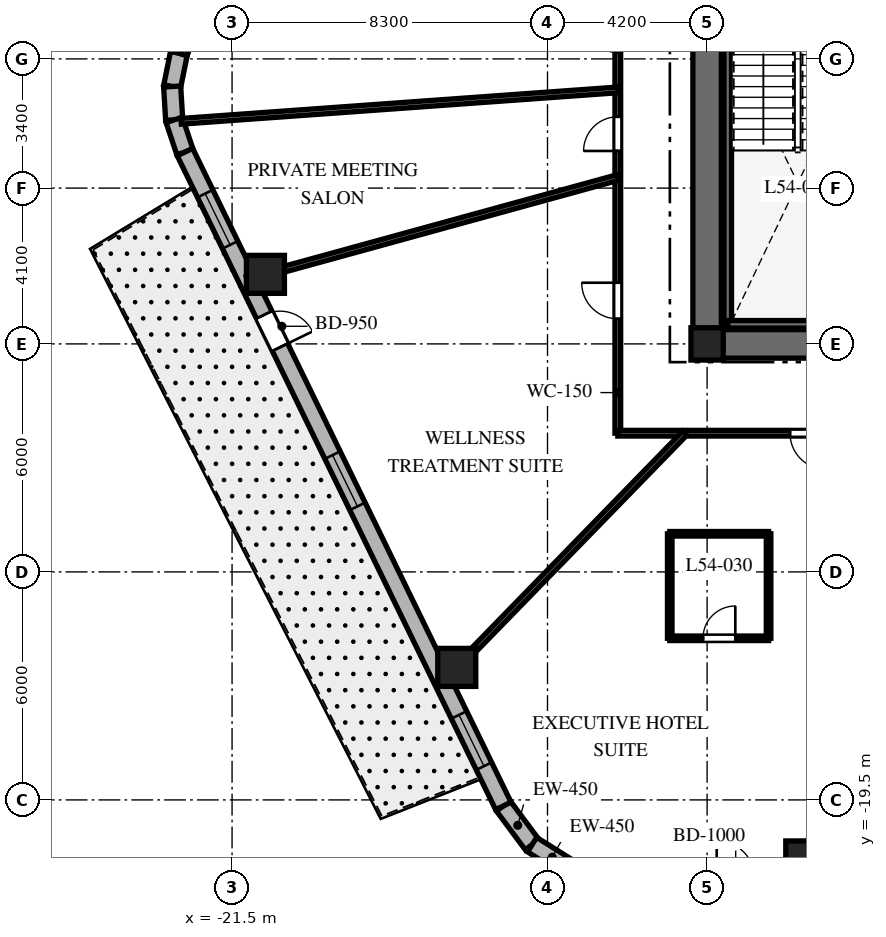
"""IFC4 building model, lengths in metres.
Left out: names, types, materials, properties, quantities, classifications, styles, units other than length and angle.
Written with IfcOpenShell. Run it as: python <this file> out.ifc"""

import sys

from ifc_helpers import new_model, si_unit, direction, frame, frame_2d, origin, origin_2d, place, context, subcontext, project, spatial, rectangle, extrude, element, fill, save


model = new_model("IFC4")
c1 = context("Model", 3, precision=1e-05, world=origin(), true_north=direction((0.0, 1.0)))
c2 = subcontext(c1, "Body", "Model", "MODEL_VIEW")
j1 = project(units=[si_unit("LENGTHUNIT", "METRE"), si_unit("PLANEANGLEUNIT", "RADIAN")], contexts=[c1])
p1 = place(None, origin())
s1 = spatial("IfcSite", under=j1, at=p1, CompositionType="ELEMENT")
p2 = place(p1, origin())
s2 = spatial("IfcBuilding", under=s1, at=p2, CompositionType="ELEMENT")
p3 = place(p2, frame((0.0, 0.0, 217.9)))
s3 = spatial("IfcBuildingStorey", under=s2, at=p3, CompositionType="ELEMENT", Elevation=217.9)
p4 = place(p3, frame((-9.375, -7.5, 0.0), z_axis=(0.0, 0.0, 1.0), x_axis=(1.0, 0.0, 0.0)))
e1 = element("IfcWall", 1, at=p4, inside=s3, PredefinedType="SHEAR", context=c2, shape_type="SweptSolid", body=[
    extrude(rectangle(XDim=18.75, YDim=0.75, at=frame_2d((9.375, 0.0))), origin(), (0.0, 0.0, 1.0), 3.8),
])
p5 = place(p4, frame((9.425, 0.0, 0.0)))
e2 = element("IfcOpeningElement", 2, at=p5, cuts=e1, PredefinedType="OPENING", context=c2, shape_type="SweptSolid", body=[
    extrude(rectangle(XDim=1.0, YDim=2.15, at=frame_2d((0.5, 1.075))), frame((0.0, 0.385, 0.0), z_axis=(0.0, -1.0, 0.0), x_axis=(1.0, 0.0, 0.0)), (0.0, 0.0, 1.0), 0.77),
])
p6 = place(p3, frame((-9.0, -7.125, 0.0), z_axis=(0.0, 0.0, 1.0), x_axis=(0.0, 1.0, 0.0)))
e3 = element("IfcWall", 3, at=p6, inside=s3, PredefinedType="SHEAR", context=c2, shape_type="SweptSolid", body=[
    extrude(rectangle(XDim=14.25, YDim=0.75, at=frame_2d((7.125, 0.0))), origin(), (0.0, 0.0, 1.0), 3.8),
])
p7 = place(p6, frame((10.25, 0.0, 0.0)))
e4 = element("IfcOpeningElement", 4, at=p7, cuts=e3, PredefinedType="OPENING", context=c2, shape_type="SweptSolid", body=[
    extrude(rectangle(XDim=1.05, YDim=2.15, at=frame_2d((0.525, 1.075))), frame((0.0, 0.385, 0.0), z_axis=(0.0, -1.0, 0.0), x_axis=(1.0, 0.0, 0.0)), (0.0, 0.0, 1.0), 0.77),
])
p8 = place(p3, frame((-8.458, -6.985, 0.0), z_axis=(0.0, 0.0, 1.0), x_axis=(0.0, 1.0, 0.0)))
e5 = element("IfcWall", 5, at=p8, inside=s3, PredefinedType="SHEAR", context=c2, shape_type="SweptSolid", body=[
    extrude(rectangle(XDim=9.143, YDim=0.2, at=frame_2d((4.572, 0.0))), origin(), (0.0, 0.0, 1.0), 3.8),
])
p9 = place(p3, frame((-8.458, -6.985, 0.0), z_axis=(0.0, 0.0, 1.0), x_axis=(1.0, 0.0, 0.0)))
e6 = element("IfcWall", 6, at=p9, inside=s3, PredefinedType="SHEAR", context=c2, shape_type="SweptSolid", body=[
    extrude(rectangle(XDim=3.686, YDim=0.2, at=frame_2d((1.843, 0.0))), origin(), (0.0, 0.0, 1.0), 3.8),
])
p10 = place(p3, frame((-9.0, -7.5, 0.0), z_axis=(0.0, 0.0, 1.0), x_axis=(1.0, 0.0, 0.0)))
e7 = element("IfcColumn", 7, at=p10, inside=s3, PredefinedType="COLUMN", context=c2, shape_type="SweptSolid", body=[
    extrude(rectangle(XDim=0.85, YDim=0.85, at=origin_2d()), origin(), (0.0, 0.0, 1.0), 3.8),
])
for number, where, z_axis, x_axis in (
    (8, (-6.43, -21.08, 0.0), (0.0, 0.0, 1.0), (1.0, 0.0, 0.0)),
    (9, (-20.622, -5.67, 0.0), (0.0, 0.0, 1.0), (1.0, 0.0, 0.0)),
    (10, (-15.587, -16.013, 0.0), (0.0, 0.0, 1.0), (1.0, 0.0, 0.0)),
):
    element("IfcColumn", number, at=place(p3, frame(where, z_axis=z_axis, x_axis=x_axis)), inside=s3, PredefinedType="COLUMN", context=c2, shape_type="SweptSolid", body=[
        extrude(rectangle(XDim=1.0, YDim=1.0, at=origin_2d()), origin(), (0.0, 0.0, 1.0), 3.8),
    ])
p11 = place(p3, frame((-14.362, -19.658, 0.0), z_axis=(0.0, 0.0, 1.0), x_axis=(0.596642462792, -0.80250717853, 0.0)))
e11 = element("IfcWall", 11, at=p11, inside=s3, PredefinedType="SOLIDWALL", context=c2, shape_type="SweptSolid", body=[
    extrude(rectangle(XDim=1.27, YDim=0.45, at=frame_2d((0.635, 0.0))), origin(), (0.0, 0.0, 1.0), 3.5),
])
p12 = place(p3, frame((-13.604, -20.678, 0.0), z_axis=(0.0, 0.0, 1.0), x_axis=(0.847910404124, -0.53013955387, 0.0)))
e12 = element("IfcWall", 12, at=p12, inside=s3, PredefinedType="SOLIDWALL", context=c2, shape_type="SweptSolid", body=[
    extrude(rectangle(XDim=1.249, YDim=0.45, at=frame_2d((0.624, 0.0))), origin(), (0.0, 0.0, 1.0), 3.5),
])
p13 = place(p3, frame((-22.898, 0.15, 0.0), z_axis=(0.0, 0.0, 1.0), x_axis=(-0.199055826889, -0.979988151858, 0.0)))
e13 = element("IfcWall", 13, at=p13, inside=s3, PredefinedType="SOLIDWALL", context=c2, shape_type="SweptSolid", body=[
    extrude(rectangle(XDim=0.894, YDim=0.45, at=frame_2d((0.447, 0.0))), origin(), (0.0, 0.0, 1.0), 3.5),
])
p14 = place(p3, frame((-23.076, -0.727, 0.0), z_axis=(0.0, 0.0, 1.0), x_axis=(0.060805222108, -0.998149650586, 0.0)))
e14 = element("IfcWall", 14, at=p14, inside=s3, PredefinedType="SOLIDWALL", context=c2, shape_type="SweptSolid", body=[
    extrude(rectangle(XDim=0.879, YDim=0.45, at=frame_2d((0.44, 0.0))), origin(), (0.0, 0.0, 1.0), 3.5),
])
p15 = place(p3, frame((-23.023, -1.604, 0.0), z_axis=(0.0, 0.0, 1.0), x_axis=(0.316801227695, -0.948491951537, 0.0)))
e15 = element("IfcWall", 15, at=p15, inside=s3, PredefinedType="SOLIDWALL", context=c2, shape_type="SweptSolid", body=[
    extrude(rectangle(XDim=0.894, YDim=0.45, at=frame_2d((0.447, 0.0))), origin(), (0.0, 0.0, 1.0), 3.5),
])
p16 = place(p3, frame((-16.324, 19.275, 0.0), z_axis=(0.0, 0.0, 1.0), x_axis=(-0.325083142304, -0.945685439557, 0.0)))
e16 = element("IfcWall", 16, at=p16, inside=s3, PredefinedType="SOLIDWALL", context=c2, shape_type="SweptSolid", body=[
    extrude(rectangle(XDim=20.224, YDim=0.45, at=frame_2d((10.112, 0.0))), origin(), (0.0, 0.0, 1.0), 3.5),
])
p17 = place(p16, frame((0.953, 0.0, 0.8)))
e17 = element("IfcOpeningElement", 17, at=p17, cuts=e16, PredefinedType="OPENING", context=c2, shape_type="SweptSolid", body=[
    extrude(rectangle(XDim=2.1, YDim=1.85, at=frame_2d((1.05, 0.925))), frame((0.0, 0.235, 0.0), z_axis=(0.0, -1.0, 0.0), x_axis=(1.0, 0.0, 0.0)), (0.0, 0.0, 1.0), 0.47),
])
p18 = place(p16, frame((6.268, 0.0, 0.8)))
e18 = element("IfcOpeningElement", 18, at=p18, cuts=e16, PredefinedType="OPENING", context=c2, shape_type="SweptSolid", body=[
    extrude(rectangle(XDim=2.1, YDim=1.85, at=frame_2d((1.05, 0.925))), frame((0.0, 0.235, 0.0), z_axis=(0.0, -1.0, 0.0), x_axis=(1.0, 0.0, 0.0)), (0.0, 0.0, 1.0), 0.47),
])
p19 = place(p16, frame((11.95, 0.0, 0.8)))
e19 = element("IfcOpeningElement", 19, at=p19, cuts=e16, PredefinedType="OPENING", context=c2, shape_type="SweptSolid", body=[
    extrude(rectangle(XDim=2.1, YDim=1.85, at=frame_2d((1.05, 0.925))), frame((0.0, 0.235, 0.0), z_axis=(0.0, -1.0, 0.0), x_axis=(1.0, 0.0, 0.0)), (0.0, 0.0, 1.0), 0.47),
])
p20 = place(p16, frame((17.118, 0.0, 0.8)))
e20 = element("IfcOpeningElement", 20, at=p20, cuts=e16, PredefinedType="OPENING", context=c2, shape_type="SweptSolid", body=[
    extrude(rectangle(XDim=2.1, YDim=1.85, at=frame_2d((1.05, 0.925))), frame((0.0, 0.235, 0.0), z_axis=(0.0, -1.0, 0.0), x_axis=(1.0, 0.0, 0.0)), (0.0, 0.0, 1.0), 0.47),
])
p21 = place(p3, frame((-22.74, -2.452, 0.0), z_axis=(0.0, 0.0, 1.0), x_axis=(0.437753424814, -0.899095066755, 0.0)))
e21 = element("IfcWall", 21, at=p21, inside=s3, PredefinedType="SOLIDWALL", context=c2, shape_type="SweptSolid", body=[
    extrude(rectangle(XDim=19.137, YDim=0.45, at=frame_2d((9.569, 0.0))), origin(), (0.0, 0.0, 1.0), 3.5),
])
p22 = place(p21, frame((4.763, 0.0, 0.0)))
e22 = element("IfcOpeningElement", 22, at=p22, cuts=e21, PredefinedType="OPENING", context=c2, shape_type="SweptSolid", body=[
    extrude(rectangle(XDim=0.95, YDim=2.15, at=frame_2d((0.475, 1.075))), frame((0.0, 0.235, 0.0), z_axis=(0.0, -1.0, 0.0), x_axis=(1.0, 0.0, 0.0)), (0.0, 0.0, 1.0), 0.47),
])
p23 = place(p21, frame((1.216, 0.0, 0.8)))
e23 = element("IfcOpeningElement", 23, at=p23, cuts=e21, PredefinedType="OPENING", context=c2, shape_type="SweptSolid", body=[
    extrude(rectangle(XDim=1.5, YDim=1.8, at=frame_2d((0.75, 0.9))), frame((0.0, 0.235, 0.0), z_axis=(0.0, -1.0, 0.0), x_axis=(1.0, 0.0, 0.0)), (0.0, 0.0, 1.0), 0.47),
])
p24 = place(p21, frame((8.87, 0.0, 0.8)))
e24 = element("IfcOpeningElement", 24, at=p24, cuts=e21, PredefinedType="OPENING", context=c2, shape_type="SweptSolid", body=[
    extrude(rectangle(XDim=1.5, YDim=1.8, at=frame_2d((0.75, 0.9))), frame((0.0, 0.235, 0.0), z_axis=(0.0, -1.0, 0.0), x_axis=(1.0, 0.0, 0.0)), (0.0, 0.0, 1.0), 0.47),
])
p25 = place(p21, frame((16.473, 0.0, 0.8)))
e25 = element("IfcOpeningElement", 25, at=p25, cuts=e21, PredefinedType="OPENING", context=c2, shape_type="SweptSolid", body=[
    extrude(rectangle(XDim=1.5, YDim=1.8, at=frame_2d((0.75, 0.9))), frame((0.0, 0.235, 0.0), z_axis=(0.0, -1.0, 0.0), x_axis=(1.0, 0.0, 0.0)), (0.0, 0.0, 1.0), 0.47),
])
p26 = place(p3, frame((-11.35, -9.85, 0.0), z_axis=(0.0, 0.0, 1.0), x_axis=(0.0, 1.0, 0.0)))
e26 = element("IfcWall", 26, at=p26, inside=s3, PredefinedType="PARTITIONING", context=c2, shape_type="SweptSolid", body=[
    extrude(rectangle(XDim=12.4, YDim=0.15, at=frame_2d((6.2, 0.0))), origin(), (0.0, 0.0, 1.0), 2.99),
])
p27 = place(p26, frame((10.017, 0.0, 0.0)))
e27 = element("IfcOpeningElement", 27, at=p27, cuts=e26, PredefinedType="OPENING", context=c2, shape_type="SweptSolid", body=[
    extrude(rectangle(XDim=0.9, YDim=2.03, at=frame_2d((0.45, 1.015))), frame((0.0, 0.085, 0.0), z_axis=(0.0, -1.0, 0.0), x_axis=(1.0, 0.0, 0.0)), (0.0, 0.0, 1.0), 0.17),
])
p28 = place(p26, frame((7.427, 0.0, 0.0)))
e28 = element("IfcOpeningElement", 28, at=p28, cuts=e26, PredefinedType="OPENING", context=c2, shape_type="SweptSolid", body=[
    extrude(rectangle(XDim=0.9, YDim=2.03, at=frame_2d((0.45, 1.015))), frame((0.0, 0.085, 0.0), z_axis=(0.0, -1.0, 0.0), x_axis=(1.0, 0.0, 0.0)), (0.0, 0.0, 1.0), 0.17),
])
p29 = place(p26, frame((3.01, 0.0, 0.0)))
e29 = element("IfcOpeningElement", 29, at=p29, cuts=e26, PredefinedType="OPENING", context=c2, shape_type="SweptSolid", body=[
    extrude(rectangle(XDim=0.95, YDim=2.03, at=frame_2d((0.475, 1.015))), frame((0.0, 0.085, 0.0), z_axis=(0.0, -1.0, 0.0), x_axis=(1.0, 0.0, 0.0)), (0.0, 0.0, 1.0), 0.17),
])
p30 = place(p3, frame((-0.92, -9.85, 0.0), z_axis=(0.0, 0.0, 1.0), x_axis=(-1.0, 0.0, 0.0)))
e30 = element("IfcWall", 30, at=p30, inside=s3, PredefinedType="PARTITIONING", context=c2, shape_type="SweptSolid", body=[
    extrude(rectangle(XDim=10.43, YDim=0.15, at=frame_2d((5.215, 0.0))), origin(), (0.0, 0.0, 1.0), 2.99),
])
p31 = place(p30, frame((4.949, 0.0, 0.0)))
e31 = element("IfcOpeningElement", 31, at=p31, cuts=e30, PredefinedType="OPENING", context=c2, shape_type="SweptSolid", body=[
    extrude(rectangle(XDim=0.95, YDim=2.03, at=frame_2d((0.475, 1.015))), frame((0.0, 0.085, 0.0), z_axis=(0.0, -1.0, 0.0), x_axis=(1.0, 0.0, 0.0)), (0.0, 0.0, 1.0), 0.17),
])
p32 = place(p3, frame((-11.35, -0.816, 0.0), z_axis=(0.0, 0.0, 1.0), x_axis=(-0.997425460629, -0.071710881252, 0.0)))
e32 = element("IfcWall", 32, at=p32, inside=s3, PredefinedType="PARTITIONING", context=c2, shape_type="SweptSolid", body=[
    extrude(rectangle(XDim=11.521, YDim=0.15, at=frame_2d((5.76, 0.0))), origin(), (0.0, 0.0, 1.0), 2.74),
])
p33 = place(p3, frame((-11.35, -3.121, 0.0), z_axis=(0.0, 0.0, 1.0), x_axis=(-0.964212793822, -0.265129568758, 0.0)))
e33 = element("IfcWall", 33, at=p33, inside=s3, PredefinedType="PARTITIONING", context=c2, shape_type="SweptSolid", body=[
    extrude(rectangle(XDim=10.12, YDim=0.15, at=frame_2d((5.06, 0.0))), origin(), (0.0, 0.0, 1.0), 2.74),
])
p34 = place(p3, frame((-9.588, -9.85, 0.0), z_axis=(0.0, 0.0, 1.0), x_axis=(-0.697519469595, -0.716565830567, 0.0)))
e34 = element("IfcWall", 34, at=p34, inside=s3, PredefinedType="PARTITIONING", context=c2, shape_type="SweptSolid", body=[
    extrude(rectangle(XDim=9.126, YDim=0.15, at=frame_2d((4.563, 0.0))), origin(), (0.0, 0.0, 1.0), 2.74),
])
p35 = place(p3, frame((-3.004, -9.85, 0.0), z_axis=(0.0, 0.0, 1.0), x_axis=(-0.291775760688, -0.956486751333, 0.0)))
e35 = element("IfcWall", 35, at=p35, inside=s3, PredefinedType="PARTITIONING", context=c2, shape_type="SweptSolid", body=[
    extrude(rectangle(XDim=12.258, YDim=0.15, at=frame_2d((6.129, 0.0))), origin(), (0.0, 0.0, 1.0), 2.74),
])
p36 = place(p3, frame((-9.983, -15.247, 0.0), z_axis=(0.0, 0.0, 1.0), x_axis=(1.0, 0.0, 0.0)))
e36 = element("IfcWall", 36, at=p36, inside=s3, PredefinedType="PARTITIONING", context=c2, shape_type="SweptSolid", body=[
    extrude(rectangle(XDim=2.6, YDim=0.12, at=frame_2d((1.3, 0.0))), origin(), (0.0, 0.0, 1.0), 3.073),
])
p37 = place(p36, frame((0.875, 0.0, 0.0)))
e37 = element("IfcOpeningElement", 37, at=p37, cuts=e36, PredefinedType="OPENING", context=c2, shape_type="SweptSolid", body=[
    extrude(rectangle(XDim=0.85, YDim=2.03, at=frame_2d((0.425, 1.015))), frame((0.0, 0.07, 0.0), z_axis=(0.0, -1.0, 0.0), x_axis=(1.0, 0.0, 0.0)), (0.0, 0.0, 1.0), 0.14),
])
p38 = place(p3, frame((-7.383, -15.247, 0.0), z_axis=(0.0, 0.0, 1.0), x_axis=(0.0, 1.0, 0.0)))
e38 = element("IfcWall", 38, at=p38, inside=s3, PredefinedType="PARTITIONING", context=c2, shape_type="SweptSolid", body=[
    extrude(rectangle(XDim=2.75, YDim=0.12, at=frame_2d((1.375, 0.0))), origin(), (0.0, 0.0, 1.0), 2.941),
])
p39 = place(p3, frame((-7.383, -12.497, 0.0), z_axis=(0.0, 0.0, 1.0), x_axis=(-1.0, 0.0, 0.0)))
e39 = element("IfcWall", 39, at=p39, inside=s3, PredefinedType="PARTITIONING", context=c2, shape_type="SweptSolid", body=[
    extrude(rectangle(XDim=2.6, YDim=0.12, at=frame_2d((1.3, 0.0))), origin(), (0.0, 0.0, 1.0), 2.941),
])
p40 = place(p3, frame((-9.983, -12.497, 0.0), z_axis=(0.0, 0.0, 1.0), x_axis=(0.0, -1.0, 0.0)))
e40 = element("IfcWall", 40, at=p40, inside=s3, PredefinedType="PARTITIONING", context=c2, shape_type="SweptSolid", body=[
    extrude(rectangle(XDim=2.75, YDim=0.12, at=frame_2d((1.375, 0.0))), origin(), (0.0, 0.0, 1.0), 3.073),
])
p41 = place(p22, origin())
e41 = element("IfcDoor", 41, at=p41, inside=s3, OperationType="SINGLE_SWING_RIGHT", PredefinedType="DOOR", context=c2, shape_type="SweptSolid", body=[
    extrude(rectangle(XDim=0.95, YDim=2.15, at=frame_2d((0.475, 1.075))), frame((0.0, 0.025, 0.0), z_axis=(0.0, -1.0, 0.0), x_axis=(1.0, 0.0, 0.0)), (0.0, 0.0, 1.0), 0.05),
])
fill(e22, e41)
p42 = place(p23, origin())
e42 = element("IfcWindow", 42, at=p42, inside=s3, PartitioningType="SINGLE_PANEL", PredefinedType="WINDOW", context=c2, shape_type="SweptSolid", body=[
    extrude(rectangle(XDim=1.5, YDim=1.8, at=frame_2d((0.75, 0.9))), frame((0.0, 0.03, 0.0), z_axis=(0.0, -1.0, 0.0), x_axis=(1.0, 0.0, 0.0)), (0.0, 0.0, 1.0), 0.06),
])
fill(e23, e42)
p43 = place(p24, origin())
e43 = element("IfcWindow", 43, at=p43, inside=s3, PartitioningType="SINGLE_PANEL", PredefinedType="WINDOW", context=c2, shape_type="SweptSolid", body=[
    extrude(rectangle(XDim=1.5, YDim=1.8, at=frame_2d((0.75, 0.9))), frame((0.0, 0.03, 0.0), z_axis=(0.0, -1.0, 0.0), x_axis=(1.0, 0.0, 0.0)), (0.0, 0.0, 1.0), 0.06),
])
fill(e24, e43)
p44 = place(p25, origin())
e44 = element("IfcWindow", 44, at=p44, inside=s3, PartitioningType="SINGLE_PANEL", PredefinedType="WINDOW", context=c2, shape_type="SweptSolid", body=[
    extrude(rectangle(XDim=1.5, YDim=1.8, at=frame_2d((0.75, 0.9))), frame((0.0, 0.03, 0.0), z_axis=(0.0, -1.0, 0.0), x_axis=(1.0, 0.0, 0.0)), (0.0, 0.0, 1.0), 0.06),
])
fill(e25, e44)
p45 = place(p27, origin())
e45 = element("IfcDoor", 45, at=p45, inside=s3, OperationType="SINGLE_SWING_RIGHT", PredefinedType="DOOR", context=c2, shape_type="SweptSolid", body=[
    extrude(rectangle(XDim=0.9, YDim=2.03, at=frame_2d((0.45, 1.015))), frame((0.0, 0.025, 0.0), z_axis=(0.0, -1.0, 0.0), x_axis=(1.0, 0.0, 0.0)), (0.0, 0.0, 1.0), 0.05),
])
fill(e27, e45)
p46 = place(p28, origin())
e46 = element("IfcDoor", 46, at=p46, inside=s3, OperationType="SINGLE_SWING_LEFT", PredefinedType="DOOR", context=c2, shape_type="SweptSolid", body=[
    extrude(rectangle(XDim=0.9, YDim=2.03, at=frame_2d((0.45, 1.015))), frame((0.0, 0.025, 0.0), z_axis=(0.0, -1.0, 0.0), x_axis=(1.0, 0.0, 0.0)), (0.0, 0.0, 1.0), 0.05),
])
fill(e28, e46)
p47 = place(p29, origin())
e47 = element("IfcDoor", 47, at=p47, inside=s3, OperationType="SINGLE_SWING_RIGHT", PredefinedType="DOOR", context=c2, shape_type="SweptSolid", body=[
    extrude(rectangle(XDim=0.95, YDim=2.03, at=frame_2d((0.475, 1.015))), frame((0.0, 0.025, 0.0), z_axis=(0.0, -1.0, 0.0), x_axis=(1.0, 0.0, 0.0)), (0.0, 0.0, 1.0), 0.05),
])
fill(e29, e47)
p48 = place(p31, origin())
e48 = element("IfcDoor", 48, at=p48, inside=s3, OperationType="SINGLE_SWING_LEFT", PredefinedType="DOOR", context=c2, shape_type="SweptSolid", body=[
    extrude(rectangle(XDim=0.95, YDim=2.03, at=frame_2d((0.475, 1.015))), frame((0.0, 0.025, 0.0), z_axis=(0.0, -1.0, 0.0), x_axis=(1.0, 0.0, 0.0)), (0.0, 0.0, 1.0), 0.05),
])
fill(e31, e48)
p49 = place(p37, origin())
e49 = element("IfcDoor", 49, at=p49, inside=s3, OperationType="SINGLE_SWING_RIGHT", PredefinedType="DOOR", context=c2, shape_type="SweptSolid", body=[
    extrude(rectangle(XDim=0.85, YDim=2.03, at=frame_2d((0.425, 1.015))), frame((0.0, 0.025, 0.0), z_axis=(0.0, -1.0, 0.0), x_axis=(1.0, 0.0, 0.0)), (0.0, 0.0, 1.0), 0.05),
])
fill(e37, e49)
save(model, sys.argv[1])
